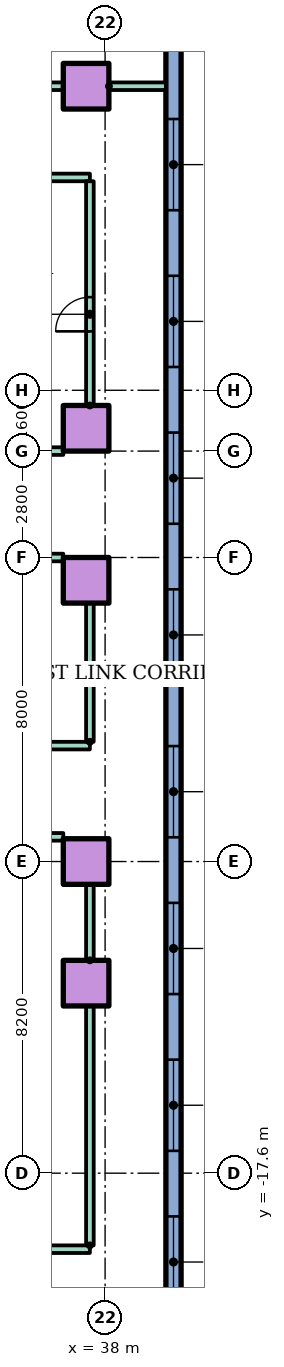
"""IFC4 building model, lengths in metres.
Left out: names, types, materials, properties, quantities, classifications, styles, units other than length and angle.
Written with IfcOpenShell. Run it as: python <this file> out.ifc"""

import sys

from ifc_helpers import new_model, si_unit, direction, frame, frame_2d, origin, origin_2d, place, context, subcontext, project, spatial, rectangle, hollow_rectangle, extrude, element, fill, save


model = new_model("IFC4")
c1 = context("Model", 3, precision=1e-05, world=origin(), true_north=direction((0.0, 1.0)))
c2 = subcontext(c1, "Body", "Model", "MODEL_VIEW")
j1 = project(units=[si_unit("LENGTHUNIT", "METRE"), si_unit("PLANEANGLEUNIT", "RADIAN")], contexts=[c1])
p1 = place(None, origin())
s1 = spatial("IfcSite", under=j1, at=p1, CompositionType="ELEMENT")
p2 = place(p1, origin())
s2 = spatial("IfcBuilding", under=s1, at=p2, CompositionType="ELEMENT")
p3 = place(p2, frame((0.0, 0.0, 22.0)))
s3 = spatial("IfcBuildingStorey", under=s2, at=p3, CompositionType="ELEMENT", Elevation=22.0)
for number, where in (
    (1, (37.5, -12.6, 0.0)),
    (2, (37.5, -9.4, 0.0)),
    (3, (37.5, -2.0, 0.0)),
    (4, (37.5, 2.0, 0.0)),
    (5, (37.5, 11.0, 0.0)),
):
    element("IfcColumn", number, at=place(p3, frame(where)), inside=s3, PredefinedType="COLUMN", context=c2, shape_type="SweptSolid", body=[
        extrude(hollow_rectangle(XDim=1.2, YDim=1.2, WallThickness=0.06, at=origin_2d()), origin(), (0.0, 0.0, 1.0), 4.0),
    ])
p4 = place(p3, frame((39.8, -50.0, 0.0), z_axis=(0.0, 0.0, 1.0), x_axis=(0.0, 1.0, 0.0)))
e6 = element("IfcWall", 6, at=p4, inside=s3, PredefinedType="STANDARD", context=c2, shape_type="SweptSolid", body=[
    extrude(rectangle(XDim=70.0, YDim=0.4, at=frame_2d((35.0, 0.0))), origin(), (0.0, 0.0, 1.0), 3.7),
])
p5 = place(p4, frame((0.75, 0.0, 0.9)))
e7 = element("IfcOpeningElement", 7, at=p5, cuts=e6, PredefinedType="OPENING", context=c2, shape_type="SweptSolid", body=[
    extrude(rectangle(XDim=2.4, YDim=2.1, at=frame_2d((1.2, 1.05))), frame((0.0, 0.21, 0.0), z_axis=(0.0, -1.0, 0.0), x_axis=(1.0, 0.0, 0.0)), (0.0, 0.0, 1.0), 0.42),
])
p6 = place(p4, frame((6.633, 0.0, 0.9)))
e8 = element("IfcOpeningElement", 8, at=p6, cuts=e6, PredefinedType="OPENING", context=c2, shape_type="SweptSolid", body=[
    extrude(rectangle(XDim=2.4, YDim=2.1, at=frame_2d((1.2, 1.05))), frame((0.0, 0.21, 0.0), z_axis=(0.0, -1.0, 0.0), x_axis=(1.0, 0.0, 0.0)), (0.0, 0.0, 1.0), 0.42),
])
p7 = place(p4, frame((10.3, 0.0, 0.9)))
e9 = element("IfcOpeningElement", 9, at=p7, cuts=e6, PredefinedType="OPENING", context=c2, shape_type="SweptSolid", body=[
    extrude(rectangle(XDim=2.4, YDim=2.1, at=frame_2d((1.2, 1.05))), frame((0.0, 0.21, 0.0), z_axis=(0.0, -1.0, 0.0), x_axis=(1.0, 0.0, 0.0)), (0.0, 0.0, 1.0), 0.42),
])
p8 = place(p4, frame((13.967, 0.0, 0.9)))
e10 = element("IfcOpeningElement", 10, at=p8, cuts=e6, PredefinedType="OPENING", context=c2, shape_type="SweptSolid", body=[
    extrude(rectangle(XDim=2.4, YDim=2.1, at=frame_2d((1.2, 1.05))), frame((0.0, 0.21, 0.0), z_axis=(0.0, -1.0, 0.0), x_axis=(1.0, 0.0, 0.0)), (0.0, 0.0, 1.0), 0.42),
])
p9 = place(p4, frame((17.633, 0.0, 0.9)))
e11 = element("IfcOpeningElement", 11, at=p9, cuts=e6, PredefinedType="OPENING", context=c2, shape_type="SweptSolid", body=[
    extrude(rectangle(XDim=2.4, YDim=2.1, at=frame_2d((1.2, 1.05))), frame((0.0, 0.21, 0.0), z_axis=(0.0, -1.0, 0.0), x_axis=(1.0, 0.0, 0.0)), (0.0, 0.0, 1.0), 0.42),
])
p10 = place(p4, frame((21.3, 0.0, 0.9)))
e12 = element("IfcOpeningElement", 12, at=p10, cuts=e6, PredefinedType="OPENING", context=c2, shape_type="SweptSolid", body=[
    extrude(rectangle(XDim=2.4, YDim=2.1, at=frame_2d((1.2, 1.05))), frame((0.0, 0.21, 0.0), z_axis=(0.0, -1.0, 0.0), x_axis=(1.0, 0.0, 0.0)), (0.0, 0.0, 1.0), 0.42),
])
p11 = place(p4, frame((24.967, 0.0, 0.9)))
e13 = element("IfcOpeningElement", 13, at=p11, cuts=e6, PredefinedType="OPENING", context=c2, shape_type="SweptSolid", body=[
    extrude(rectangle(XDim=2.4, YDim=2.1, at=frame_2d((1.2, 1.05))), frame((0.0, 0.21, 0.0), z_axis=(0.0, -1.0, 0.0), x_axis=(1.0, 0.0, 0.0)), (0.0, 0.0, 1.0), 0.42),
])
p12 = place(p4, frame((28.863, 0.0, 0.9)))
e14 = element("IfcOpeningElement", 14, at=p12, cuts=e6, PredefinedType="OPENING", context=c2, shape_type="SweptSolid", body=[
    extrude(rectangle(XDim=2.4, YDim=2.1, at=frame_2d((1.2, 1.05))), frame((0.0, 0.21, 0.0), z_axis=(0.0, -1.0, 0.0), x_axis=(1.0, 0.0, 0.0)), (0.0, 0.0, 1.0), 0.42),
])
p13 = place(p4, frame((32.988, 0.0, 0.9)))
e15 = element("IfcOpeningElement", 15, at=p13, cuts=e6, PredefinedType="OPENING", context=c2, shape_type="SweptSolid", body=[
    extrude(rectangle(XDim=2.4, YDim=2.1, at=frame_2d((1.2, 1.05))), frame((0.0, 0.21, 0.0), z_axis=(0.0, -1.0, 0.0), x_axis=(1.0, 0.0, 0.0)), (0.0, 0.0, 1.0), 0.42),
])
p14 = place(p4, frame((37.113, 0.0, 0.9)))
e16 = element("IfcOpeningElement", 16, at=p14, cuts=e6, PredefinedType="OPENING", context=c2, shape_type="SweptSolid", body=[
    extrude(rectangle(XDim=2.4, YDim=2.1, at=frame_2d((1.2, 1.05))), frame((0.0, 0.21, 0.0), z_axis=(0.0, -1.0, 0.0), x_axis=(1.0, 0.0, 0.0)), (0.0, 0.0, 1.0), 0.42),
])
p15 = place(p4, frame((41.238, 0.0, 0.9)))
e17 = element("IfcOpeningElement", 17, at=p15, cuts=e6, PredefinedType="OPENING", context=c2, shape_type="SweptSolid", body=[
    extrude(rectangle(XDim=2.4, YDim=2.1, at=frame_2d((1.2, 1.05))), frame((0.0, 0.21, 0.0), z_axis=(0.0, -1.0, 0.0), x_axis=(1.0, 0.0, 0.0)), (0.0, 0.0, 1.0), 0.42),
])
p16 = place(p4, frame((45.363, 0.0, 0.9)))
e18 = element("IfcOpeningElement", 18, at=p16, cuts=e6, PredefinedType="OPENING", context=c2, shape_type="SweptSolid", body=[
    extrude(rectangle(XDim=2.4, YDim=2.1, at=frame_2d((1.2, 1.05))), frame((0.0, 0.21, 0.0), z_axis=(0.0, -1.0, 0.0), x_axis=(1.0, 0.0, 0.0)), (0.0, 0.0, 1.0), 0.42),
])
p17 = place(p4, frame((49.488, 0.0, 0.9)))
e19 = element("IfcOpeningElement", 19, at=p17, cuts=e6, PredefinedType="OPENING", context=c2, shape_type="SweptSolid", body=[
    extrude(rectangle(XDim=2.4, YDim=2.1, at=frame_2d((1.2, 1.05))), frame((0.0, 0.21, 0.0), z_axis=(0.0, -1.0, 0.0), x_axis=(1.0, 0.0, 0.0)), (0.0, 0.0, 1.0), 0.42),
])
p18 = place(p4, frame((53.613, 0.0, 0.9)))
e20 = element("IfcOpeningElement", 20, at=p18, cuts=e6, PredefinedType="OPENING", context=c2, shape_type="SweptSolid", body=[
    extrude(rectangle(XDim=2.4, YDim=2.1, at=frame_2d((1.2, 1.05))), frame((0.0, 0.21, 0.0), z_axis=(0.0, -1.0, 0.0), x_axis=(1.0, 0.0, 0.0)), (0.0, 0.0, 1.0), 0.42),
])
p19 = place(p4, frame((57.738, 0.0, 0.9)))
e21 = element("IfcOpeningElement", 21, at=p19, cuts=e6, PredefinedType="OPENING", context=c2, shape_type="SweptSolid", body=[
    extrude(rectangle(XDim=2.4, YDim=2.1, at=frame_2d((1.2, 1.05))), frame((0.0, 0.21, 0.0), z_axis=(0.0, -1.0, 0.0), x_axis=(1.0, 0.0, 0.0)), (0.0, 0.0, 1.0), 0.42),
])
p20 = place(p4, frame((62.05, 0.0, 0.9)))
e22 = element("IfcOpeningElement", 22, at=p20, cuts=e6, PredefinedType="OPENING", context=c2, shape_type="SweptSolid", body=[
    extrude(rectangle(XDim=2.4, YDim=2.1, at=frame_2d((1.2, 1.05))), frame((0.0, 0.21, 0.0), z_axis=(0.0, -1.0, 0.0), x_axis=(1.0, 0.0, 0.0)), (0.0, 0.0, 1.0), 0.42),
])
p21 = place(p4, frame((66.55, 0.0, 0.9)))
e23 = element("IfcOpeningElement", 23, at=p21, cuts=e6, PredefinedType="OPENING", context=c2, shape_type="SweptSolid", body=[
    extrude(rectangle(XDim=2.4, YDim=2.1, at=frame_2d((1.2, 1.05))), frame((0.0, 0.21, 0.0), z_axis=(0.0, -1.0, 0.0), x_axis=(1.0, 0.0, 0.0)), (0.0, 0.0, 1.0), 0.42),
])
p22 = place(p3, frame((-37.6, -19.6, 0.0)))
e24 = element("IfcWall", 24, at=p22, inside=s3, PredefinedType="PARTITIONING", context=c2, shape_type="SweptSolid", body=[
    extrude(rectangle(XDim=75.2, YDim=0.2, at=frame_2d((37.6, 0.0))), origin(), (0.0, 0.0, 1.0), 3.2),
])
p23 = place(p22, frame((5.5, 0.0, 0.0)))
e25 = element("IfcOpeningElement", 25, at=p23, cuts=e24, PredefinedType="OPENING", context=c2, shape_type="SweptSolid", body=[
    extrude(rectangle(XDim=1.0, YDim=2.1, at=frame_2d((0.5, 1.05))), frame((0.0, 0.11, 0.0), z_axis=(0.0, -1.0, 0.0), x_axis=(1.0, 0.0, 0.0)), (0.0, 0.0, 1.0), 0.22),
])
p24 = place(p22, frame((17.5, 0.0, 0.0)))
e26 = element("IfcOpeningElement", 26, at=p24, cuts=e24, PredefinedType="OPENING", context=c2, shape_type="SweptSolid", body=[
    extrude(rectangle(XDim=1.0, YDim=2.1, at=frame_2d((0.5, 1.05))), frame((0.0, 0.11, 0.0), z_axis=(0.0, -1.0, 0.0), x_axis=(1.0, 0.0, 0.0)), (0.0, 0.0, 1.0), 0.22),
])
p25 = place(p22, frame((29.5, 0.0, 0.0)))
e27 = element("IfcOpeningElement", 27, at=p25, cuts=e24, PredefinedType="OPENING", context=c2, shape_type="SweptSolid", body=[
    extrude(rectangle(XDim=1.0, YDim=2.1, at=frame_2d((0.5, 1.05))), frame((0.0, 0.11, 0.0), z_axis=(0.0, -1.0, 0.0), x_axis=(1.0, 0.0, 0.0)), (0.0, 0.0, 1.0), 0.22),
])
p26 = place(p22, frame((40.5, 0.0, 0.0)))
e28 = element("IfcOpeningElement", 28, at=p26, cuts=e24, PredefinedType="OPENING", context=c2, shape_type="SweptSolid", body=[
    extrude(rectangle(XDim=1.0, YDim=2.1, at=frame_2d((0.5, 1.05))), frame((0.0, 0.11, 0.0), z_axis=(0.0, -1.0, 0.0), x_axis=(1.0, 0.0, 0.0)), (0.0, 0.0, 1.0), 0.22),
])
p27 = place(p22, frame((51.5, 0.0, 0.0)))
e29 = element("IfcOpeningElement", 29, at=p27, cuts=e24, PredefinedType="OPENING", context=c2, shape_type="SweptSolid", body=[
    extrude(rectangle(XDim=1.0, YDim=2.1, at=frame_2d((0.5, 1.05))), frame((0.0, 0.11, 0.0), z_axis=(0.0, -1.0, 0.0), x_axis=(1.0, 0.0, 0.0)), (0.0, 0.0, 1.0), 0.22),
])
p28 = place(p22, frame((66.1, 0.0, 0.0)))
e30 = element("IfcOpeningElement", 30, at=p28, cuts=e24, PredefinedType="OPENING", context=c2, shape_type="SweptSolid", body=[
    extrude(rectangle(XDim=1.0, YDim=2.1, at=frame_2d((0.5, 1.05))), frame((0.0, 0.11, 0.0), z_axis=(0.0, -1.0, 0.0), x_axis=(1.0, 0.0, 0.0)), (0.0, 0.0, 1.0), 0.22),
])
p29 = place(p3, frame((-36.9, -8.75, 0.0)))
e31 = element("IfcWall", 31, at=p29, inside=s3, PredefinedType="PARTITIONING", context=c2, shape_type="SweptSolid", body=[
    extrude(rectangle(XDim=73.8, YDim=0.2, at=frame_2d((36.9, 0.0))), origin(), (0.0, 0.0, 1.0), 3.2),
])
p30 = place(p3, frame((-37.6, -6.35, 0.0)))
e32 = element("IfcWall", 32, at=p30, inside=s3, PredefinedType="PARTITIONING", context=c2, shape_type="SweptSolid", body=[
    extrude(rectangle(XDim=75.2, YDim=0.2, at=frame_2d((37.6, 0.0))), origin(), (0.0, 0.0, 1.0), 3.2),
])
p31 = place(p30, frame((5.5, 0.0, 0.0)))
e33 = element("IfcOpeningElement", 33, at=p31, cuts=e32, PredefinedType="OPENING", context=c2, shape_type="SweptSolid", body=[
    extrude(rectangle(XDim=1.0, YDim=2.1, at=frame_2d((0.5, 1.05))), frame((0.0, 0.11, 0.0), z_axis=(0.0, -1.0, 0.0), x_axis=(1.0, 0.0, 0.0)), (0.0, 0.0, 1.0), 0.22),
])
p32 = place(p30, frame((17.55, 0.0, 0.0)))
e34 = element("IfcOpeningElement", 34, at=p32, cuts=e32, PredefinedType="OPENING", context=c2, shape_type="SweptSolid", body=[
    extrude(rectangle(XDim=0.9, YDim=2.1, at=frame_2d((0.45, 1.05))), frame((0.0, 0.11, 0.0), z_axis=(0.0, -1.0, 0.0), x_axis=(1.0, 0.0, 0.0)), (0.0, 0.0, 1.0), 0.22),
])
p33 = place(p30, frame((29.55, 0.0, 0.0)))
e35 = element("IfcOpeningElement", 35, at=p33, cuts=e32, PredefinedType="OPENING", context=c2, shape_type="SweptSolid", body=[
    extrude(rectangle(XDim=0.9, YDim=2.1, at=frame_2d((0.45, 1.05))), frame((0.0, 0.11, 0.0), z_axis=(0.0, -1.0, 0.0), x_axis=(1.0, 0.0, 0.0)), (0.0, 0.0, 1.0), 0.22),
])
p34 = place(p30, frame((40.5, 0.0, 0.0)))
e36 = element("IfcOpeningElement", 36, at=p34, cuts=e32, PredefinedType="OPENING", context=c2, shape_type="SweptSolid", body=[
    extrude(rectangle(XDim=1.0, YDim=2.1, at=frame_2d((0.5, 1.05))), frame((0.0, 0.11, 0.0), z_axis=(0.0, -1.0, 0.0), x_axis=(1.0, 0.0, 0.0)), (0.0, 0.0, 1.0), 0.22),
])
p35 = place(p30, frame((60.1, 0.0, 0.0)))
e37 = element("IfcOpeningElement", 37, at=p35, cuts=e32, PredefinedType="OPENING", context=c2, shape_type="SweptSolid", body=[
    extrude(rectangle(XDim=1.0, YDim=2.1, at=frame_2d((0.5, 1.05))), frame((0.0, 0.11, 0.0), z_axis=(0.0, -1.0, 0.0), x_axis=(1.0, 0.0, 0.0)), (0.0, 0.0, 1.0), 0.22),
])
p36 = place(p3, frame((14.0, -1.4, 0.0)))
e38 = element("IfcWall", 38, at=p36, inside=s3, PredefinedType="PARTITIONING", context=c2, shape_type="SweptSolid", body=[
    extrude(rectangle(XDim=22.9, YDim=0.2, at=frame_2d((11.45, 0.0))), origin(), (0.0, 0.0, 1.0), 3.2),
])
p37 = place(p3, frame((16.3, 1.4, 0.0)))
e39 = element("IfcWall", 39, at=p37, inside=s3, PredefinedType="PARTITIONING", context=c2, shape_type="SweptSolid", body=[
    extrude(rectangle(XDim=20.6, YDim=0.2, at=frame_2d((10.3, 0.0))), origin(), (0.0, 0.0, 1.0), 3.2),
])
p38 = place(p37, frame((2.35, 0.0, 0.0)))
e40 = element("IfcOpeningElement", 40, at=p38, cuts=e39, PredefinedType="OPENING", context=c2, shape_type="SweptSolid", body=[
    extrude(rectangle(XDim=1.0, YDim=2.1, at=frame_2d((0.5, 1.05))), frame((0.0, 0.11, 0.0), z_axis=(0.0, -1.0, 0.0), x_axis=(1.0, 0.0, 0.0)), (0.0, 0.0, 1.0), 0.22),
])
p39 = place(p37, frame((7.1, 0.0, 0.0)))
e41 = element("IfcOpeningElement", 41, at=p39, cuts=e39, PredefinedType="OPENING", context=c2, shape_type="SweptSolid", body=[
    extrude(rectangle(XDim=1.0, YDim=2.1, at=frame_2d((0.5, 1.05))), frame((0.0, 0.11, 0.0), z_axis=(0.0, -1.0, 0.0), x_axis=(1.0, 0.0, 0.0)), (0.0, 0.0, 1.0), 0.22),
])
p40 = place(p37, frame((10.8, 0.0, 0.0)))
e42 = element("IfcOpeningElement", 42, at=p40, cuts=e39, PredefinedType="OPENING", context=c2, shape_type="SweptSolid", body=[
    extrude(rectangle(XDim=1.0, YDim=2.1, at=frame_2d((0.5, 1.05))), frame((0.0, 0.11, 0.0), z_axis=(0.0, -1.0, 0.0), x_axis=(1.0, 0.0, 0.0)), (0.0, 0.0, 1.0), 0.22),
])
p41 = place(p37, frame((13.15, 0.0, 0.0)))
e43 = element("IfcOpeningElement", 43, at=p41, cuts=e39, PredefinedType="OPENING", context=c2, shape_type="SweptSolid", body=[
    extrude(rectangle(XDim=0.9, YDim=2.1, at=frame_2d((0.45, 1.05))), frame((0.0, 0.11, 0.0), z_axis=(0.0, -1.0, 0.0), x_axis=(1.0, 0.0, 0.0)), (0.0, 0.0, 1.0), 0.22),
])
p42 = place(p3, frame((16.3, 8.6, 0.0)))
e44 = element("IfcWall", 44, at=p42, inside=s3, PredefinedType="PARTITIONING", context=c2, shape_type="SweptSolid", body=[
    extrude(rectangle(XDim=21.3, YDim=0.2, at=frame_2d((10.65, 0.0))), origin(), (0.0, 0.0, 1.0), 3.2),
])
p43 = place(p3, frame((34.5, 11.0, 0.0)))
e45 = element("IfcWall", 45, at=p43, inside=s3, PredefinedType="PARTITIONING", context=c2, shape_type="SweptSolid", body=[
    extrude(rectangle(XDim=2.4, YDim=0.2, at=frame_2d((1.2, 0.0))), origin(), (0.0, 0.0, 1.0), 3.2),
])
p44 = place(p3, frame((38.1, 11.0, 0.0)))
e46 = element("IfcWall", 46, at=p44, inside=s3, PredefinedType="PARTITIONING", context=c2, shape_type="SweptSolid", body=[
    extrude(rectangle(XDim=1.5, YDim=0.2, at=frame_2d((0.75, 0.0))), origin(), (0.0, 0.0, 1.0), 3.2),
])
p45 = place(p3, frame((37.6, -19.5, 0.0), z_axis=(0.0, 0.0, 1.0), x_axis=(0.0, 1.0, 0.0)))
e47 = element("IfcWall", 47, at=p45, inside=s3, PredefinedType="PARTITIONING", context=c2, shape_type="SweptSolid", body=[
    extrude(rectangle(XDim=6.3, YDim=0.2, at=frame_2d((3.15, 0.0))), origin(), (0.0, 0.0, 1.0), 3.2),
])
p46 = place(p3, frame((37.6, -12.0, 0.0), z_axis=(0.0, 0.0, 1.0), x_axis=(0.0, 1.0, 0.0)))
e48 = element("IfcWall", 48, at=p46, inside=s3, PredefinedType="PARTITIONING", context=c2, shape_type="SweptSolid", body=[
    extrude(rectangle(XDim=2.0, YDim=0.2, at=frame_2d((1.0, 0.0))), origin(), (0.0, 0.0, 1.0), 3.2),
])
p47 = place(p3, frame((37.6, -6.25, 0.0), z_axis=(0.0, 0.0, 1.0), x_axis=(0.0, 1.0, 0.0)))
e49 = element("IfcWall", 49, at=p47, inside=s3, PredefinedType="PARTITIONING", context=c2, shape_type="SweptSolid", body=[
    extrude(rectangle(XDim=3.65, YDim=0.2, at=frame_2d((1.825, 0.0))), origin(), (0.0, 0.0, 1.0), 3.2),
])
p48 = place(p3, frame((37.6, 2.6, 0.0), z_axis=(0.0, 0.0, 1.0), x_axis=(0.0, 1.0, 0.0)))
e50 = element("IfcWall", 50, at=p48, inside=s3, PredefinedType="PARTITIONING", context=c2, shape_type="SweptSolid", body=[
    extrude(rectangle(XDim=5.9, YDim=0.2, at=frame_2d((2.95, 0.0))), origin(), (0.0, 0.0, 1.0), 3.2),
])
p49 = place(p48, frame((1.95, 0.0, 0.0)))
e51 = element("IfcOpeningElement", 51, at=p49, cuts=e50, PredefinedType="OPENING", context=c2, shape_type="SweptSolid", body=[
    extrude(rectangle(XDim=0.9, YDim=2.1, at=frame_2d((0.45, 1.05))), frame((0.0, 0.11, 0.0), z_axis=(0.0, -1.0, 0.0), x_axis=(1.0, 0.0, 0.0)), (0.0, 0.0, 1.0), 0.22),
])
p50 = place(p12, origin())
e52 = element("IfcWindow", 52, at=p50, inside=s3, PartitioningType="SINGLE_PANEL", PredefinedType="WINDOW", context=c2, shape_type="SweptSolid", body=[
    extrude(rectangle(XDim=2.4, YDim=2.1, at=frame_2d((1.2, 1.05))), frame((0.0, 0.03, 0.0), z_axis=(0.0, -1.0, 0.0), x_axis=(1.0, 0.0, 0.0)), (0.0, 0.0, 1.0), 0.06),
])
fill(e14, e52)
p51 = place(p13, origin())
e53 = element("IfcWindow", 53, at=p51, inside=s3, PartitioningType="SINGLE_PANEL", PredefinedType="WINDOW", context=c2, shape_type="SweptSolid", body=[
    extrude(rectangle(XDim=2.4, YDim=2.1, at=frame_2d((1.2, 1.05))), frame((0.0, 0.03, 0.0), z_axis=(0.0, -1.0, 0.0), x_axis=(1.0, 0.0, 0.0)), (0.0, 0.0, 1.0), 0.06),
])
fill(e15, e53)
p52 = place(p14, origin())
e54 = element("IfcWindow", 54, at=p52, inside=s3, PartitioningType="SINGLE_PANEL", PredefinedType="WINDOW", context=c2, shape_type="SweptSolid", body=[
    extrude(rectangle(XDim=2.4, YDim=2.1, at=frame_2d((1.2, 1.05))), frame((0.0, 0.03, 0.0), z_axis=(0.0, -1.0, 0.0), x_axis=(1.0, 0.0, 0.0)), (0.0, 0.0, 1.0), 0.06),
])
fill(e16, e54)
p53 = place(p15, origin())
e55 = element("IfcWindow", 55, at=p53, inside=s3, PartitioningType="SINGLE_PANEL", PredefinedType="WINDOW", context=c2, shape_type="SweptSolid", body=[
    extrude(rectangle(XDim=2.4, YDim=2.1, at=frame_2d((1.2, 1.05))), frame((0.0, 0.03, 0.0), z_axis=(0.0, -1.0, 0.0), x_axis=(1.0, 0.0, 0.0)), (0.0, 0.0, 1.0), 0.06),
])
fill(e17, e55)
p54 = place(p16, origin())
e56 = element("IfcWindow", 56, at=p54, inside=s3, PartitioningType="SINGLE_PANEL", PredefinedType="WINDOW", context=c2, shape_type="SweptSolid", body=[
    extrude(rectangle(XDim=2.4, YDim=2.1, at=frame_2d((1.2, 1.05))), frame((0.0, 0.03, 0.0), z_axis=(0.0, -1.0, 0.0), x_axis=(1.0, 0.0, 0.0)), (0.0, 0.0, 1.0), 0.06),
])
fill(e18, e56)
p55 = place(p17, origin())
e57 = element("IfcWindow", 57, at=p55, inside=s3, PartitioningType="SINGLE_PANEL", PredefinedType="WINDOW", context=c2, shape_type="SweptSolid", body=[
    extrude(rectangle(XDim=2.4, YDim=2.1, at=frame_2d((1.2, 1.05))), frame((0.0, 0.03, 0.0), z_axis=(0.0, -1.0, 0.0), x_axis=(1.0, 0.0, 0.0)), (0.0, 0.0, 1.0), 0.06),
])
fill(e19, e57)
p56 = place(p18, origin())
e58 = element("IfcWindow", 58, at=p56, inside=s3, PartitioningType="SINGLE_PANEL", PredefinedType="WINDOW", context=c2, shape_type="SweptSolid", body=[
    extrude(rectangle(XDim=2.4, YDim=2.1, at=frame_2d((1.2, 1.05))), frame((0.0, 0.03, 0.0), z_axis=(0.0, -1.0, 0.0), x_axis=(1.0, 0.0, 0.0)), (0.0, 0.0, 1.0), 0.06),
])
fill(e20, e58)
p57 = place(p19, origin())
e59 = element("IfcWindow", 59, at=p57, inside=s3, PartitioningType="SINGLE_PANEL", PredefinedType="WINDOW", context=c2, shape_type="SweptSolid", body=[
    extrude(rectangle(XDim=2.4, YDim=2.1, at=frame_2d((1.2, 1.05))), frame((0.0, 0.03, 0.0), z_axis=(0.0, -1.0, 0.0), x_axis=(1.0, 0.0, 0.0)), (0.0, 0.0, 1.0), 0.06),
])
fill(e21, e59)
p58 = place(p49, origin())
e60 = element("IfcDoor", 60, at=p58, inside=s3, OperationType="SINGLE_SWING_LEFT", PredefinedType="DOOR", context=c2, shape_type="SweptSolid", body=[
    extrude(rectangle(XDim=0.9, YDim=2.1, at=frame_2d((0.45, 1.05))), frame((0.0, 0.025, 0.0), z_axis=(0.0, -1.0, 0.0), x_axis=(1.0, 0.0, 0.0)), (0.0, 0.0, 1.0), 0.05),
])
fill(e51, e60)
save(model, sys.argv[1])
